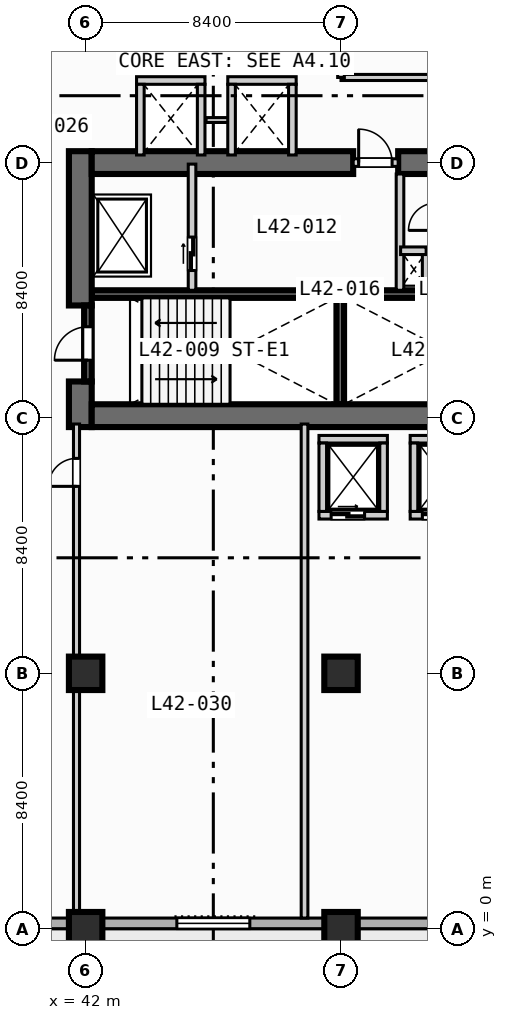
"""IFC4 building model, lengths in metres.
Left out: names, types, materials, properties, quantities, classifications, styles, units other than length and angle.
Written with IfcOpenShell. Run it as: python <this file> out.ifc"""

import sys

from ifc_helpers import new_model, si_unit, direction, frame, frame_2d, origin, origin_2d, place, context, subcontext, project, spatial, rectangle, extrude, element, fill, save


model = new_model("IFC4")
c1 = context("Model", 3, precision=1e-05, world=origin(), true_north=direction((0.0, 1.0)))
c2 = subcontext(c1, "Body", "Model", "MODEL_VIEW")
j1 = project(units=[si_unit("LENGTHUNIT", "METRE"), si_unit("PLANEANGLEUNIT", "RADIAN")], contexts=[c1])
p1 = place(None, origin())
s1 = spatial("IfcSite", under=j1, at=p1, CompositionType="ELEMENT")
p2 = place(p1, origin())
s2 = spatial("IfcBuilding", under=s1, at=p2, CompositionType="ELEMENT")
p3 = place(p2, frame((0.0, 0.0, 175.4)))
s3 = spatial("IfcBuildingStorey", under=s2, at=p3, CompositionType="ELEMENT", Elevation=175.4)
for number, where, z_axis, x_axis in (
    (1, (42.2, 20.875, 0.0), (0.0, 0.0, 1.0), (1.0, 0.0, 0.0)),
    (2, (50.5, 20.875, 0.0), (0.0, 0.0, 1.0), (1.0, 0.0, 0.0)),
):
    element("IfcWall", number, at=place(p3, frame(where, z_axis=z_axis, x_axis=x_axis)), inside=s3, PredefinedType="SOLIDWALL", context=c2, shape_type="SweptSolid", body=[
        extrude(rectangle(XDim=8.05, YDim=0.25, at=frame_2d((4.025, 0.0))), origin(), (0.0, 0.0, 1.0), 3.47),
    ])
p4 = place(p3, frame((50.375, 17.25, 0.0), z_axis=(0.0, 0.0, 1.0), x_axis=(0.0, 1.0, 0.0)))
e3 = element("IfcWall", 3, at=p4, inside=s3, PredefinedType="SOLIDWALL", context=c2, shape_type="SweptSolid", body=[
    extrude(rectangle(XDim=3.5, YDim=0.25, at=frame_2d((1.75, 0.0))), origin(), (0.0, 0.0, 1.0), 3.47),
])
p5 = place(p3, frame((41.825, 16.5, 0.0), z_axis=(0.0, 0.0, 1.0), x_axis=(0.0, 1.0, 0.0)))
e4 = element("IfcWall", 4, at=p5, inside=s3, PredefinedType="SHEAR", context=c2, shape_type="SweptSolid", body=[
    extrude(rectangle(XDim=1.5, YDim=0.75, at=frame_2d((0.75, 0.0))), origin(), (0.0, 0.0, 1.0), 3.47),
])
p6 = place(p3, frame((41.825, 20.5, 0.0), z_axis=(0.0, 0.0, 1.0), x_axis=(0.0, 1.0, 0.0)))
e5 = element("IfcWall", 5, at=p6, inside=s3, PredefinedType="SHEAR", context=c2, shape_type="SweptSolid", body=[
    extrude(rectangle(XDim=5.075, YDim=0.75, at=frame_2d((2.538, 0.0))), origin(), (0.0, 0.0, 1.0), 3.47),
])
p7 = place(p3, frame((42.2, 16.875, 0.0), z_axis=(0.0, 0.0, 1.0), x_axis=(1.0, 0.0, 0.0)))
e6 = element("IfcWall", 6, at=p7, inside=s3, PredefinedType="SHEAR", context=c2, shape_type="SweptSolid", body=[
    extrude(rectangle(XDim=16.35, YDim=0.75, at=frame_2d((8.175, 0.0))), origin(), (0.0, 0.0, 1.0), 3.47),
])
p8 = place(p3, frame((42.2, 25.2, 0.0), z_axis=(0.0, 0.0, 1.0), x_axis=(1.0, 0.0, 0.0)))
e7 = element("IfcWall", 7, at=p8, inside=s3, PredefinedType="SHEAR", context=c2, shape_type="SweptSolid", body=[
    extrude(rectangle(XDim=8.6, YDim=0.75, at=frame_2d((4.3, 0.0))), origin(), (0.0, 0.0, 1.0), 3.47),
])
p9 = place(p3, frame((52.28, 25.2, 0.0), z_axis=(0.0, 0.0, 1.0), x_axis=(1.0, 0.0, 0.0)))
e8 = element("IfcWall", 8, at=p9, inside=s3, PredefinedType="SHEAR", context=c2, shape_type="SweptSolid", body=[
    extrude(rectangle(XDim=1.27, YDim=0.75, at=frame_2d((0.635, 0.0))), origin(), (0.0, 0.0, 1.0), 3.47),
])
for number, where, z_axis, x_axis in (
    (9, (42.0, 0.0, 0.0), (0.0, 0.0, 1.0), (1.0, 0.0, 0.0)),
    (10, (42.0, 8.4, 0.0), (0.0, 0.0, 1.0), (1.0, 0.0, 0.0)),
    (11, (50.4, 0.0, 0.0), (0.0, 0.0, 1.0), (1.0, 0.0, 0.0)),
    (12, (50.4, 8.4, 0.0), (0.0, 0.0, 1.0), (1.0, 0.0, 0.0)),
):
    element("IfcColumn", number, at=place(p3, frame(where, z_axis=z_axis, x_axis=x_axis)), inside=s3, PredefinedType="COLUMN", context=c2, shape_type="SweptSolid", body=[
        extrude(rectangle(XDim=1.1, YDim=1.1, at=origin_2d()), origin(), (0.0, 0.0, 1.0), 3.7),
    ])
p10 = place(p3, frame((72.425, 0.175, 0.0), z_axis=(0.0, 0.0, 1.0), x_axis=(-1.0, 0.0, 0.0)))
e13 = element("IfcWall", 13, at=p10, inside=s3, PredefinedType="STANDARD", context=c2, shape_type="SweptSolid", body=[
    extrude(rectangle(XDim=69.25, YDim=0.35, at=frame_2d((34.625, 0.0))), origin(), (0.0, 0.0, 1.0), 3.47),
])
p11 = place(p10, frame((51.725, 0.0, 0.0)))
e14 = element("IfcOpeningElement", 14, at=p11, cuts=e13, PredefinedType="OPENING", context=c2, shape_type="SweptSolid", body=[
    extrude(rectangle(XDim=1.4, YDim=2.2, at=frame_2d((0.7, 1.1))), frame((0.0, 0.185, 0.0), z_axis=(0.0, -1.0, 0.0), x_axis=(1.0, 0.0, 0.0)), (0.0, 0.0, 1.0), 0.37),
])
p12 = place(p10, frame((33.725, 0.0, 0.85)))
e15 = element("IfcOpeningElement", 15, at=p12, cuts=e13, PredefinedType="OPENING", context=c2, shape_type="SweptSolid", body=[
    extrude(rectangle(XDim=1.8, YDim=1.8, at=frame_2d((0.9, 0.9))), frame((0.0, 0.185, 0.0), z_axis=(0.0, -1.0, 0.0), x_axis=(1.0, 0.0, 0.0)), (0.0, 0.0, 1.0), 0.37),
])
p13 = place(p10, frame((25.025, 0.0, 0.85)))
e16 = element("IfcOpeningElement", 16, at=p13, cuts=e13, PredefinedType="OPENING", context=c2, shape_type="SweptSolid", body=[
    extrude(rectangle(XDim=2.4, YDim=1.95, at=frame_2d((1.2, 0.975))), frame((0.0, 0.185, 0.0), z_axis=(0.0, -1.0, 0.0), x_axis=(1.0, 0.0, 0.0)), (0.0, 0.0, 1.0), 0.37),
])
p14 = place(p10, frame((8.225, 0.0, 0.85)))
e17 = element("IfcOpeningElement", 17, at=p14, cuts=e13, PredefinedType="OPENING", context=c2, shape_type="SweptSolid", body=[
    extrude(rectangle(XDim=2.4, YDim=1.95, at=frame_2d((1.2, 0.975))), frame((0.0, 0.185, 0.0), z_axis=(0.0, -1.0, 0.0), x_axis=(1.0, 0.0, 0.0)), (0.0, 0.0, 1.0), 0.37),
])
p15 = place(p10, frame((64.725, 0.0, 0.85)))
e18 = element("IfcOpeningElement", 18, at=p15, cuts=e13, PredefinedType="OPENING", context=c2, shape_type="SweptSolid", body=[
    extrude(rectangle(XDim=1.8, YDim=1.8, at=frame_2d((0.9, 0.9))), frame((0.0, 0.185, 0.0), z_axis=(0.0, -1.0, 0.0), x_axis=(1.0, 0.0, 0.0)), (0.0, 0.0, 1.0), 0.37),
])
p16 = place(p10, frame((44.675, 0.0, 0.85)))
e19 = element("IfcOpeningElement", 19, at=p16, cuts=e13, PredefinedType="OPENING", context=c2, shape_type="SweptSolid", body=[
    extrude(rectangle(XDim=1.8, YDim=1.8, at=frame_2d((0.9, 0.9))), frame((0.0, 0.185, 0.0), z_axis=(0.0, -1.0, 0.0), x_axis=(1.0, 0.0, 0.0)), (0.0, 0.0, 1.0), 0.37),
])
p17 = place(p3, frame((42.075, 18.0, 0.0), z_axis=(0.0, 0.0, 1.0), x_axis=(0.0, 1.0, 0.0)))
e20 = element("IfcWall", 20, at=p17, inside=s3, PredefinedType="SOLIDWALL", context=c2, shape_type="SweptSolid", body=[
    extrude(rectangle(XDim=2.5, YDim=0.25, at=frame_2d((1.25, 0.0))), origin(), (0.0, 0.0, 1.0), 3.47),
])
p18 = place(p17, frame((0.7, 0.0, 0.0)))
e21 = element("IfcOpeningElement", 21, at=p18, cuts=e20, PredefinedType="OPENING", context=c2, shape_type="SweptSolid", body=[
    extrude(rectangle(XDim=1.1, YDim=2.15, at=frame_2d((0.55, 1.075))), frame((0.0, 0.135, 0.0), z_axis=(0.0, -1.0, 0.0), x_axis=(1.0, 0.0, 0.0)), (0.0, 0.0, 1.0), 0.27),
])
p19 = place(p3, frame((45.5, 21.0, 0.0), z_axis=(0.0, 0.0, 1.0), x_axis=(0.0, 1.0, 0.0)))
e22 = element("IfcWall", 22, at=p19, inside=s3, PredefinedType="SOLIDWALL", context=c2, shape_type="SweptSolid", body=[
    extrude(rectangle(XDim=4.15, YDim=0.25, at=frame_2d((2.075, 0.0))), origin(), (0.0, 0.0, 1.0), 3.47),
])
p20 = place(p19, frame((0.65, 0.0, 0.0)))
e23 = element("IfcOpeningElement", 23, at=p20, cuts=e22, PredefinedType="OPENING", context=c2, shape_type="SweptSolid", body=[
    extrude(rectangle(XDim=1.1, YDim=2.15, at=frame_2d((0.55, 1.075))), frame((0.0, 0.135, 0.0), z_axis=(0.0, -1.0, 0.0), x_axis=(1.0, 0.0, 0.0)), (0.0, 0.0, 1.0), 0.27),
])
p21 = place(p3, frame((50.8, 25.2, 0.0), z_axis=(0.0, 0.0, 1.0), x_axis=(1.0, 0.0, 0.0)))
e24 = element("IfcWall", 24, at=p21, inside=s3, PredefinedType="SOLIDWALL", context=c2, shape_type="SweptSolid", body=[
    extrude(rectangle(XDim=1.48, YDim=0.25, at=frame_2d((0.74, 0.0))), origin(), (0.0, 0.0, 1.0), 3.47),
])
p22 = place(p21, frame((0.18, 0.0, 0.0)))
e25 = element("IfcOpeningElement", 25, at=p22, cuts=e24, PredefinedType="OPENING", context=c2, shape_type="SweptSolid", body=[
    extrude(rectangle(XDim=1.1, YDim=2.15, at=frame_2d((0.55, 1.075))), frame((0.0, 0.135, 0.0), z_axis=(0.0, -1.0, 0.0), x_axis=(1.0, 0.0, 0.0)), (0.0, 0.0, 1.0), 0.27),
])
p23 = place(p3, frame((52.34, 21.0, 0.0), z_axis=(0.0, 0.0, 1.0), x_axis=(0.0, 1.0, 0.0)))
e26 = element("IfcWall", 26, at=p23, inside=s3, PredefinedType="SOLIDWALL", context=c2, shape_type="SweptSolid", body=[
    extrude(rectangle(XDim=3.825, YDim=0.25, at=frame_2d((1.913, 0.0))), origin(), (0.0, 0.0, 1.0), 3.47),
])
p24 = place(p3, frame((53.2, 21.0, 0.0), z_axis=(0.0, 0.0, 1.0), x_axis=(0.0, 1.0, 0.0)))
e27 = element("IfcWall", 27, at=p24, inside=s3, PredefinedType="SOLIDWALL", context=c2, shape_type="SweptSolid", body=[
    extrude(rectangle(XDim=1.3, YDim=0.25, at=frame_2d((0.65, 0.0))), origin(), (0.0, 0.0, 1.0), 3.47),
])
p25 = place(p3, frame((52.36, 22.3, 0.0), z_axis=(0.0, 0.0, 1.0), x_axis=(1.0, 0.0, 0.0)))
e28 = element("IfcWall", 28, at=p25, inside=s3, PredefinedType="SOLIDWALL", context=c2, shape_type="SweptSolid", body=[
    extrude(rectangle(XDim=0.84, YDim=0.25, at=frame_2d((0.42, 0.0))), origin(), (0.0, 0.0, 1.0), 3.47),
])
p26 = place(p3, frame((49.675, 13.6, 0.0), z_axis=(0.0, 0.0, 1.0), x_axis=(1.0, 0.0, 0.0)))
e29 = element("IfcWall", 29, at=p26, inside=s3, PredefinedType="SOLIDWALL", context=c2, shape_type="SweptSolid", body=[
    extrude(rectangle(XDim=2.25, YDim=0.25, at=frame_2d((1.125, 0.0))), origin(), (0.0, 0.0, 1.0), 3.47),
])
p27 = place(p26, frame((0.4, 0.0, 0.0)))
e30 = element("IfcOpeningElement", 30, at=p27, cuts=e29, PredefinedType="OPENING", context=c2, shape_type="SweptSolid", body=[
    extrude(rectangle(XDim=1.1, YDim=2.15, at=frame_2d((0.55, 1.075))), frame((0.0, 0.135, 0.0), z_axis=(0.0, -1.0, 0.0), x_axis=(1.0, 0.0, 0.0)), (0.0, 0.0, 1.0), 0.27),
])
for number, where, z_axis, x_axis in (
    (31, (49.675, 16.1, 0.0), (0.0, 0.0, 1.0), (1.0, 0.0, 0.0)),
    (32, (49.8, 13.725, 0.0), (0.0, 0.0, 1.0), (0.0, 1.0, 0.0)),
    (33, (51.8, 13.725, 0.0), (0.0, 0.0, 1.0), (0.0, 1.0, 0.0)),
):
    element("IfcWall", number, at=place(p3, frame(where, z_axis=z_axis, x_axis=x_axis)), inside=s3, PredefinedType="SOLIDWALL", context=c2, shape_type="SweptSolid", body=[
        extrude(rectangle(XDim=2.25, YDim=0.25, at=frame_2d((1.125, 0.0))), origin(), (0.0, 0.0, 1.0), 3.47),
    ])
p28 = place(p3, frame((52.675, 13.6, 0.0), z_axis=(0.0, 0.0, 1.0), x_axis=(1.0, 0.0, 0.0)))
e34 = element("IfcWall", 34, at=p28, inside=s3, PredefinedType="SOLIDWALL", context=c2, shape_type="SweptSolid", body=[
    extrude(rectangle(XDim=2.25, YDim=0.25, at=frame_2d((1.125, 0.0))), origin(), (0.0, 0.0, 1.0), 3.47),
])
p29 = place(p28, frame((0.4, 0.0, 0.0)))
e35 = element("IfcOpeningElement", 35, at=p29, cuts=e34, PredefinedType="OPENING", context=c2, shape_type="SweptSolid", body=[
    extrude(rectangle(XDim=1.1, YDim=2.15, at=frame_2d((0.55, 1.075))), frame((0.0, 0.135, 0.0), z_axis=(0.0, -1.0, 0.0), x_axis=(1.0, 0.0, 0.0)), (0.0, 0.0, 1.0), 0.27),
])
for number, where, z_axis, x_axis in (
    (36, (52.675, 16.1, 0.0), (0.0, 0.0, 1.0), (1.0, 0.0, 0.0)),
    (37, (52.8, 13.725, 0.0), (0.0, 0.0, 1.0), (0.0, 1.0, 0.0)),
    (38, (43.675, 27.9, 0.0), (0.0, 0.0, 1.0), (1.0, 0.0, 0.0)),
):
    element("IfcWall", number, at=place(p3, frame(where, z_axis=z_axis, x_axis=x_axis)), inside=s3, PredefinedType="SOLIDWALL", context=c2, shape_type="SweptSolid", body=[
        extrude(rectangle(XDim=2.25, YDim=0.25, at=frame_2d((1.125, 0.0))), origin(), (0.0, 0.0, 1.0), 3.47),
    ])
for number, where, z_axis, x_axis in (
    (39, (43.8, 25.45, 0.0), (0.0, 0.0, 1.0), (0.0, 1.0, 0.0)),
    (40, (45.8, 25.45, 0.0), (0.0, 0.0, 1.0), (0.0, 1.0, 0.0)),
):
    element("IfcWall", number, at=place(p3, frame(where, z_axis=z_axis, x_axis=x_axis)), inside=s3, PredefinedType="SOLIDWALL", context=c2, shape_type="SweptSolid", body=[
        extrude(rectangle(XDim=2.325, YDim=0.25, at=frame_2d((1.163, 0.0))), origin(), (0.0, 0.0, 1.0), 3.47),
    ])
p30 = place(p3, frame((45.96, 26.6, 0.0), z_axis=(0.0, 0.0, 1.0), x_axis=(1.0, 0.0, 0.0)))
e41 = element("IfcWall", 41, at=p30, inside=s3, PredefinedType="PARTITIONING", context=c2, shape_type="SweptSolid", body=[
    extrude(rectangle(XDim=0.88, YDim=0.16, at=frame_2d((0.44, 0.0))), origin(), (0.0, 0.0, 1.0), 3.47),
])
p31 = place(p3, frame((46.675, 27.9, 0.0), z_axis=(0.0, 0.0, 1.0), x_axis=(1.0, 0.0, 0.0)))
e42 = element("IfcWall", 42, at=p31, inside=s3, PredefinedType="SOLIDWALL", context=c2, shape_type="SweptSolid", body=[
    extrude(rectangle(XDim=2.25, YDim=0.25, at=frame_2d((1.125, 0.0))), origin(), (0.0, 0.0, 1.0), 3.47),
])
for number, where, z_axis, x_axis in (
    (43, (46.8, 25.45, 0.0), (0.0, 0.0, 1.0), (0.0, 1.0, 0.0)),
    (44, (48.8, 25.45, 0.0), (0.0, 0.0, 1.0), (0.0, 1.0, 0.0)),
):
    element("IfcWall", number, at=place(p3, frame(where, z_axis=z_axis, x_axis=x_axis)), inside=s3, PredefinedType="SOLIDWALL", context=c2, shape_type="SweptSolid", body=[
        extrude(rectangle(XDim=2.325, YDim=0.25, at=frame_2d((1.163, 0.0))), origin(), (0.0, 0.0, 1.0), 3.47),
    ])
p32 = place(p3, frame((41.7, 0.35, 0.0), z_axis=(0.0, 0.0, 1.0), x_axis=(0.0, 1.0, 0.0)))
e45 = element("IfcWall", 45, at=p32, inside=s3, PredefinedType="PARTITIONING", context=c2, shape_type="SweptSolid", body=[
    extrude(rectangle(XDim=16.25, YDim=0.2, at=frame_2d((8.125, 0.0))), origin(), (0.0, 0.0, 1.0), 2.82),
])
p33 = place(p32, frame((14.2, 0.0, 0.0)))
e46 = element("IfcOpeningElement", 46, at=p33, cuts=e45, PredefinedType="OPENING", context=c2, shape_type="SweptSolid", body=[
    extrude(rectangle(XDim=0.92, YDim=2.1, at=frame_2d((0.46, 1.05))), frame((0.0, 0.11, 0.0), z_axis=(0.0, -1.0, 0.0), x_axis=(1.0, 0.0, 0.0)), (0.0, 0.0, 1.0), 0.22),
])
p34 = place(p3, frame((49.2, 0.35, 0.0), z_axis=(0.0, 0.0, 1.0), x_axis=(0.0, 1.0, 0.0)))
e47 = element("IfcWall", 47, at=p34, inside=s3, PredefinedType="PARTITIONING", context=c2, shape_type="SweptSolid", body=[
    extrude(rectangle(XDim=16.25, YDim=0.22, at=frame_2d((8.125, 0.0))), origin(), (0.0, 0.0, 1.0), 3.47),
])
p35 = place(p3, frame((50.4, 28.0, 0.0), z_axis=(0.0, 0.0, 1.0), x_axis=(1.0, 0.0, 0.0)))
e48 = element("IfcWall", 48, at=p35, inside=s3, PredefinedType="PARTITIONING", context=c2, shape_type="SweptSolid", body=[
    extrude(rectangle(XDim=21.8, YDim=0.2, at=frame_2d((10.9, 0.0))), origin(), (0.0, 0.0, 1.0), 3.47),
])
p36 = place(p35, frame((4.0, 0.0, 0.0)))
e49 = element("IfcOpeningElement", 49, at=p36, cuts=e48, PredefinedType="OPENING", context=c2, shape_type="SweptSolid", body=[
    extrude(rectangle(XDim=0.92, YDim=2.1, at=frame_2d((0.46, 1.05))), frame((0.0, 0.11, 0.0), z_axis=(0.0, -1.0, 0.0), x_axis=(1.0, 0.0, 0.0)), (0.0, 0.0, 1.0), 0.22),
])
p37 = place(p3, frame((50.4, 28.0, 0.0), z_axis=(0.0, 0.0, 1.0), x_axis=(0.0, 1.0, 0.0)))
e50 = element("IfcWall", 50, at=p37, inside=s3, PredefinedType="PARTITIONING", context=c2, shape_type="SweptSolid", body=[
    extrude(rectangle(XDim=5.3, YDim=0.22, at=frame_2d((2.65, 0.0))), origin(), (0.0, 0.0, 1.0), 2.82),
])
p38 = place(p13, origin())
e51 = element("IfcWindow", 51, at=p38, inside=s3, PartitioningType="SINGLE_PANEL", PredefinedType="WINDOW", context=c2, shape_type="SweptSolid", body=[
    extrude(rectangle(XDim=2.4, YDim=1.95, at=frame_2d((1.2, 0.975))), frame((0.0, 0.03, 0.0), z_axis=(0.0, -1.0, 0.0), x_axis=(1.0, 0.0, 0.0)), (0.0, 0.0, 1.0), 0.06),
])
fill(e16, e51)
p39 = place(p18, origin())
e52 = element("IfcDoor", 52, at=p39, inside=s3, OperationType="SINGLE_SWING_LEFT", PredefinedType="DOOR", context=c2, shape_type="SweptSolid", body=[
    extrude(rectangle(XDim=1.1, YDim=2.15, at=frame_2d((0.55, 1.075))), frame((0.0, 0.025, 0.0), z_axis=(0.0, -1.0, 0.0), x_axis=(1.0, 0.0, 0.0)), (0.0, 0.0, 1.0), 0.05),
])
fill(e21, e52)
p40 = place(p20, origin())
e53 = element("IfcDoor", 53, at=p40, inside=s3, OperationType="SLIDING_TO_LEFT", PredefinedType="DOOR", context=c2, shape_type="SweptSolid", body=[
    extrude(rectangle(XDim=1.1, YDim=2.15, at=frame_2d((0.55, 1.075))), frame((0.0, 0.025, 0.0), z_axis=(0.0, -1.0, 0.0), x_axis=(1.0, 0.0, 0.0)), (0.0, 0.0, 1.0), 0.05),
])
fill(e23, e53)
p41 = place(p22, origin())
e54 = element("IfcDoor", 54, at=p41, inside=s3, OperationType="SINGLE_SWING_LEFT", PredefinedType="DOOR", context=c2, shape_type="SweptSolid", body=[
    extrude(rectangle(XDim=1.1, YDim=2.15, at=frame_2d((0.55, 1.075))), frame((0.0, 0.025, 0.0), z_axis=(0.0, -1.0, 0.0), x_axis=(1.0, 0.0, 0.0)), (0.0, 0.0, 1.0), 0.05),
])
fill(e25, e54)
p42 = place(p27, origin())
e55 = element("IfcDoor", 55, at=p42, inside=s3, OperationType="SLIDING_TO_LEFT", PredefinedType="DOOR", context=c2, shape_type="SweptSolid", body=[
    extrude(rectangle(XDim=1.1, YDim=2.15, at=frame_2d((0.55, 1.075))), frame((0.0, 0.025, 0.0), z_axis=(0.0, -1.0, 0.0), x_axis=(1.0, 0.0, 0.0)), (0.0, 0.0, 1.0), 0.05),
])
fill(e30, e55)
p43 = place(p29, origin())
e56 = element("IfcDoor", 56, at=p43, inside=s3, OperationType="SLIDING_TO_LEFT", PredefinedType="DOOR", context=c2, shape_type="SweptSolid", body=[
    extrude(rectangle(XDim=1.1, YDim=2.15, at=frame_2d((0.55, 1.075))), frame((0.0, 0.025, 0.0), z_axis=(0.0, -1.0, 0.0), x_axis=(1.0, 0.0, 0.0)), (0.0, 0.0, 1.0), 0.05),
])
fill(e35, e56)
p44 = place(p33, origin())
e57 = element("IfcDoor", 57, at=p44, inside=s3, OperationType="SINGLE_SWING_LEFT", PredefinedType="DOOR", context=c2, shape_type="SweptSolid", body=[
    extrude(rectangle(XDim=0.92, YDim=2.1, at=frame_2d((0.46, 1.05))), frame((0.0, 0.025, 0.0), z_axis=(0.0, -1.0, 0.0), x_axis=(1.0, 0.0, 0.0)), (0.0, 0.0, 1.0), 0.05),
])
fill(e46, e57)
save(model, sys.argv[1])
